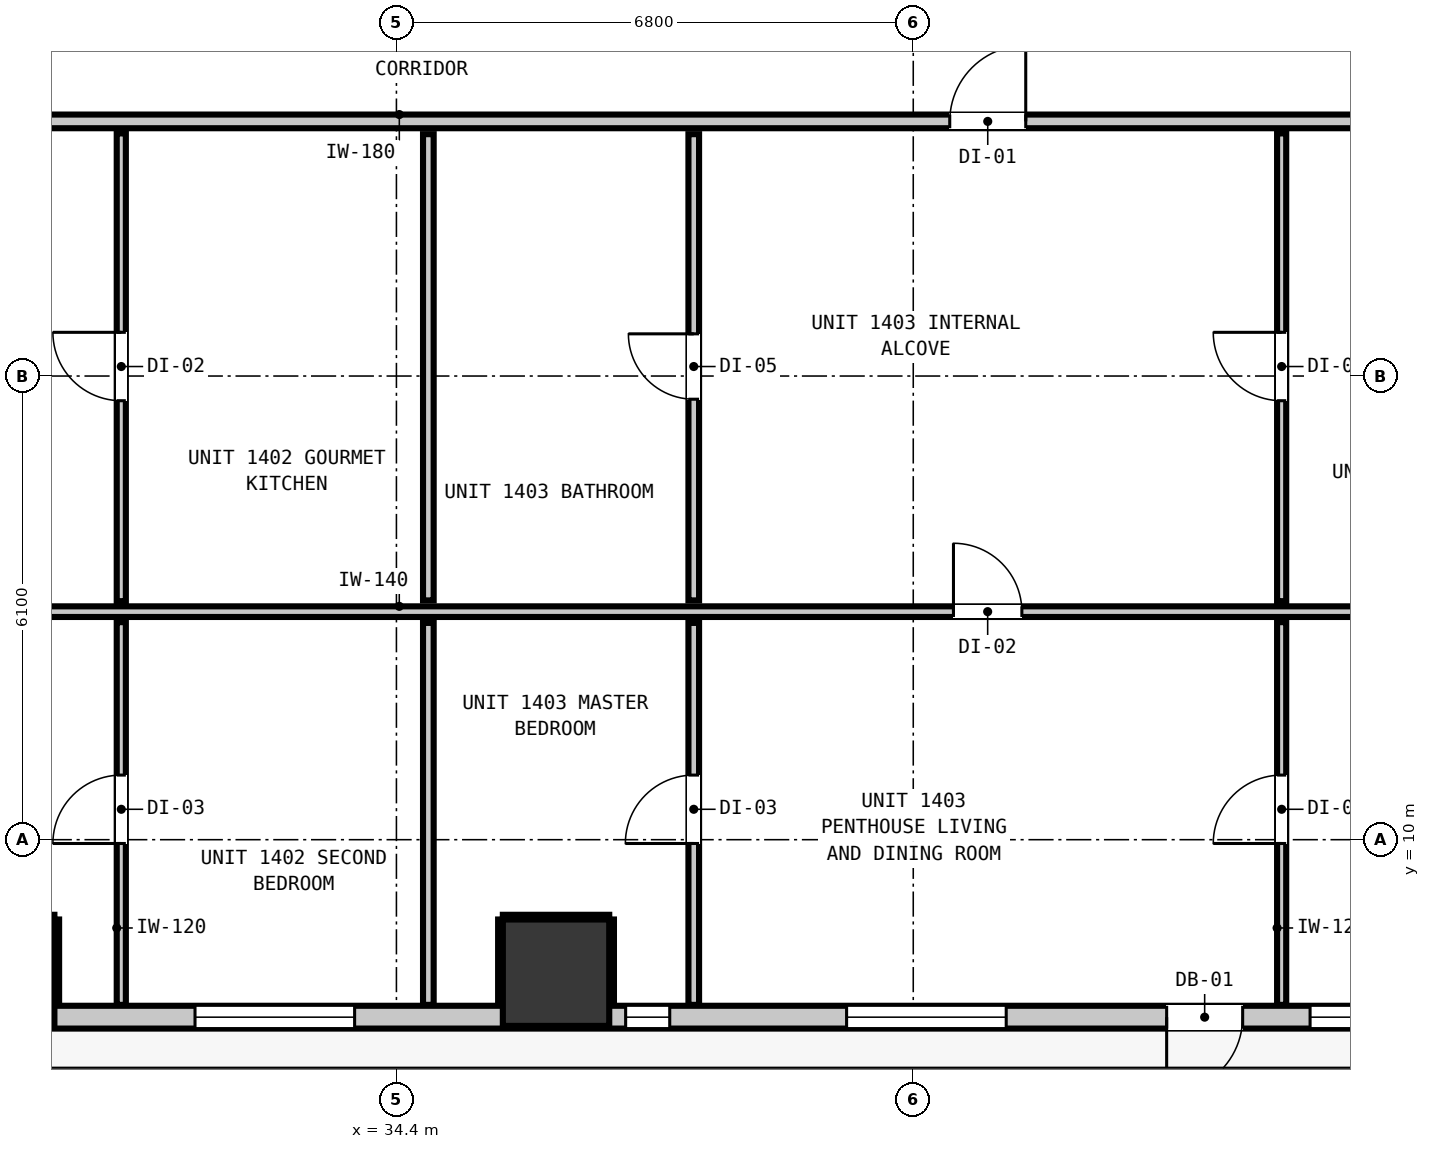
"""IFC4 building model, lengths in metres.
Left out: names, types, materials, properties, quantities, classifications, styles, units other than length and angle.
Written with IfcOpenShell. Run it as: python <this file> out.ifc"""

import sys

from ifc_helpers import new_model, si_unit, direction, frame, frame_2d, origin, origin_2d, place, context, subcontext, project, spatial, rectangle, extrude, element, fill, save


model = new_model("IFC4")
c1 = context("Model", 3, precision=1e-05, world=origin(), true_north=direction((0.0, 1.0)))
c2 = subcontext(c1, "Body", "Model", "MODEL_VIEW")
j1 = project(units=[si_unit("LENGTHUNIT", "METRE"), si_unit("PLANEANGLEUNIT", "RADIAN")], contexts=[c1])
p1 = place(None, origin())
s1 = spatial("IfcSite", under=j1, at=p1, CompositionType="ELEMENT")
p2 = place(p1, origin())
s2 = spatial("IfcBuilding", under=s1, at=p2, CompositionType="ELEMENT")
p3 = place(p2, frame((0.0, 0.0, 51.88)))
s3 = spatial("IfcBuildingStorey", under=s2, at=p3, CompositionType="ELEMENT", Elevation=51.88)
for number, where, z_axis, x_axis in (
    (1, (29.2, 8.25, 0.0), (0.0, 0.0, 1.0), (1.0, 0.0, 0.0)),
    (2, (36.5, 8.25, 0.0), (0.0, 0.0, 1.0), (1.0, 0.0, 0.0)),
):
    element("IfcColumn", number, at=place(p3, frame(where, z_axis=z_axis, x_axis=x_axis)), inside=s3, PredefinedType="COLUMN", context=c2, shape_type="SweptSolid", body=[
        extrude(rectangle(XDim=1.4, YDim=1.4, at=origin_2d()), origin(), (0.0, 0.0, 1.0), 3.32),
    ])
p4 = place(p3, frame((47.835, 7.665, 0.0), z_axis=(0.0, 0.0, 1.0), x_axis=(-1.0, 0.0, 0.0)))
e3 = element("IfcWall", 3, at=p4, inside=s3, PredefinedType="STANDARD", context=c2, shape_type="SweptSolid", body=[
    extrude(rectangle(XDim=37.47, YDim=0.3, at=frame_2d((18.735, 0.0))), origin(), (0.0, 0.0, 1.0), 3.06),
])
p5 = place(p4, frame((2.301, 0.0, 0.0)))
e4 = element("IfcOpeningElement", 4, at=p5, cuts=e3, PredefinedType="OPENING", context=c2, shape_type="SweptSolid", body=[
    extrude(rectangle(XDim=1.0, YDim=2.15, at=frame_2d((0.5, 1.075))), frame((0.0, 0.16, 0.0), z_axis=(0.0, -1.0, 0.0), x_axis=(1.0, 0.0, 0.0)), (0.0, 0.0, 1.0), 0.32),
])
p6 = place(p4, frame((32.251, 0.0, 0.85)))
e5 = element("IfcOpeningElement", 5, at=p6, cuts=e3, PredefinedType="OPENING", context=c2, shape_type="SweptSolid", body=[
    extrude(rectangle(XDim=1.05, YDim=1.65, at=frame_2d((0.525, 0.825))), frame((0.0, 0.16, 0.0), z_axis=(0.0, -1.0, 0.0), x_axis=(1.0, 0.0, 0.0)), (0.0, 0.0, 1.0), 0.32),
])
p7 = place(p4, frame((21.179, 0.0, 0.85)))
e6 = element("IfcOpeningElement", 6, at=p7, cuts=e3, PredefinedType="OPENING", context=c2, shape_type="SweptSolid", body=[
    extrude(rectangle(XDim=2.1, YDim=1.9, at=frame_2d((1.05, 0.95))), frame((0.0, 0.16, 0.0), z_axis=(0.0, -1.0, 0.0), x_axis=(1.0, 0.0, 0.0)), (0.0, 0.0, 1.0), 0.32),
])
p8 = place(p4, frame((25.539, 0.0, 0.85)))
e7 = element("IfcOpeningElement", 7, at=p8, cuts=e3, PredefinedType="OPENING", context=c2, shape_type="SweptSolid", body=[
    extrude(rectangle(XDim=0.58, YDim=1.5, at=frame_2d((0.29, 0.75))), frame((0.0, 0.16, 0.0), z_axis=(0.0, -1.0, 0.0), x_axis=(1.0, 0.0, 0.0)), (0.0, 0.0, 1.0), 0.32),
])
p9 = place(p4, frame((13.985, 0.0, 0.85)))
e8 = element("IfcOpeningElement", 8, at=p9, cuts=e3, PredefinedType="OPENING", context=c2, shape_type="SweptSolid", body=[
    extrude(rectangle(XDim=2.1, YDim=1.9, at=frame_2d((1.05, 0.95))), frame((0.0, 0.16, 0.0), z_axis=(0.0, -1.0, 0.0), x_axis=(1.0, 0.0, 0.0)), (0.0, 0.0, 1.0), 0.32),
])
p10 = place(p4, frame((5.412, 0.0, 0.85)))
e9 = element("IfcOpeningElement", 9, at=p10, cuts=e3, PredefinedType="OPENING", context=c2, shape_type="SweptSolid", body=[
    extrude(rectangle(XDim=2.1, YDim=1.9, at=frame_2d((1.05, 0.95))), frame((0.0, 0.16, 0.0), z_axis=(0.0, -1.0, 0.0), x_axis=(1.0, 0.0, 0.0)), (0.0, 0.0, 1.0), 0.32),
])
p11 = place(p4, frame((9.839, 0.0, 0.85)))
e10 = element("IfcOpeningElement", 10, at=p11, cuts=e3, PredefinedType="OPENING", context=c2, shape_type="SweptSolid", body=[
    extrude(rectangle(XDim=0.58, YDim=1.5, at=frame_2d((0.29, 0.75))), frame((0.0, 0.16, 0.0), z_axis=(0.0, -1.0, 0.0), x_axis=(1.0, 0.0, 0.0)), (0.0, 0.0, 1.0), 0.32),
])
p12 = place(p4, frame((0.364, 0.0, 0.85)))
e11 = element("IfcOpeningElement", 11, at=p12, cuts=e3, PredefinedType="OPENING", context=c2, shape_type="SweptSolid", body=[
    extrude(rectangle(XDim=1.05, YDim=1.65, at=frame_2d((0.525, 0.825))), frame((0.0, 0.16, 0.0), z_axis=(0.0, -1.0, 0.0), x_axis=(1.0, 0.0, 0.0)), (0.0, 0.0, 1.0), 0.32),
])
p13 = place(p3, frame((8.027, 19.45, 0.0), z_axis=(0.0, 0.0, 1.0), x_axis=(1.0, 0.0, 0.0)))
e12 = element("IfcWall", 12, at=p13, inside=s3, PredefinedType="PARTITIONING", context=c2, shape_type="SweptSolid", body=[
    extrude(rectangle(XDim=42.146, YDim=0.18, at=frame_2d((21.073, 0.0))), origin(), (0.0, 0.0, 1.0), 3.06),
])
p14 = place(p13, frame((5.256, 0.0, 0.0)))
e13 = element("IfcOpeningElement", 13, at=p14, cuts=e12, PredefinedType="OPENING", context=c2, shape_type="SweptSolid", body=[
    extrude(rectangle(XDim=1.0, YDim=2.15, at=frame_2d((0.5, 1.075))), frame((0.0, 0.1, 0.0), z_axis=(0.0, -1.0, 0.0), x_axis=(1.0, 0.0, 0.0)), (0.0, 0.0, 1.0), 0.2),
])
p15 = place(p13, frame((18.169, 0.0, 0.0)))
e14 = element("IfcOpeningElement", 14, at=p15, cuts=e12, PredefinedType="OPENING", context=c2, shape_type="SweptSolid", body=[
    extrude(rectangle(XDim=1.0, YDim=2.15, at=frame_2d((0.5, 1.075))), frame((0.0, 0.1, 0.0), z_axis=(0.0, -1.0, 0.0), x_axis=(1.0, 0.0, 0.0)), (0.0, 0.0, 1.0), 0.2),
])
p16 = place(p13, frame((33.653, 0.0, 0.0)))
e15 = element("IfcOpeningElement", 15, at=p16, cuts=e12, PredefinedType="OPENING", context=c2, shape_type="SweptSolid", body=[
    extrude(rectangle(XDim=1.0, YDim=2.15, at=frame_2d((0.5, 1.075))), frame((0.0, 0.1, 0.0), z_axis=(0.0, -1.0, 0.0), x_axis=(1.0, 0.0, 0.0)), (0.0, 0.0, 1.0), 0.2),
])
p17 = place(p3, frame((19.12, 13.0, 0.0), z_axis=(0.0, 0.0, 1.0), x_axis=(1.0, 0.0, 0.0)))
e16 = element("IfcWall", 16, at=p17, inside=s3, PredefinedType="PARTITIONING", context=c2, shape_type="SweptSolid", body=[
    extrude(rectangle(XDim=31.053, YDim=0.14, at=frame_2d((15.526, 0.0))), origin(), (0.0, 0.0, 1.0), 3.06),
])
p18 = place(p17, frame((7.126, 0.0, 0.0)))
e17 = element("IfcOpeningElement", 17, at=p18, cuts=e16, PredefinedType="OPENING", context=c2, shape_type="SweptSolid", body=[
    extrude(rectangle(XDim=0.9, YDim=2.1, at=frame_2d((0.45, 1.05))), frame((0.0, 0.08, 0.0), z_axis=(0.0, -1.0, 0.0), x_axis=(1.0, 0.0, 0.0)), (0.0, 0.0, 1.0), 0.16),
])
p19 = place(p17, frame((22.609, 0.0, 0.0)))
e18 = element("IfcOpeningElement", 18, at=p19, cuts=e16, PredefinedType="OPENING", context=c2, shape_type="SweptSolid", body=[
    extrude(rectangle(XDim=0.9, YDim=2.1, at=frame_2d((0.45, 1.05))), frame((0.0, 0.08, 0.0), z_axis=(0.0, -1.0, 0.0), x_axis=(1.0, 0.0, 0.0)), (0.0, 0.0, 1.0), 0.16),
])
p20 = place(p3, frame((34.82, 7.827, 0.0), z_axis=(0.0, 0.0, 1.0), x_axis=(0.0, 1.0, 0.0)))
e19 = element("IfcWall", 19, at=p20, inside=s3, PredefinedType="PARTITIONING", context=c2, shape_type="SweptSolid", body=[
    extrude(rectangle(XDim=5.025, YDim=0.14, at=frame_2d((2.513, 0.0))), origin(), (0.0, 0.0, 1.0), 3.06),
])
p21 = place(p3, frame((34.82, 13.148, 0.0), z_axis=(0.0, 0.0, 1.0), x_axis=(0.0, 1.0, 0.0)))
e20 = element("IfcWall", 20, at=p21, inside=s3, PredefinedType="PARTITIONING", context=c2, shape_type="SweptSolid", body=[
    extrude(rectangle(XDim=6.134, YDim=0.14, at=frame_2d((3.067, 0.0))), origin(), (0.0, 0.0, 1.0), 3.06),
])
p22 = place(p3, frame((38.312, 7.827, 0.0), z_axis=(0.0, 0.0, 1.0), x_axis=(0.0, 1.0, 0.0)))
e21 = element("IfcWall", 21, at=p22, inside=s3, PredefinedType="PARTITIONING", context=c2, shape_type="SweptSolid", body=[
    extrude(rectangle(XDim=5.025, YDim=0.14, at=frame_2d((2.513, 0.0))), origin(), (0.0, 0.0, 1.0), 3.06),
])
p23 = place(p22, frame((2.123, 0.0, 0.0)))
e22 = element("IfcOpeningElement", 22, at=p23, cuts=e21, PredefinedType="OPENING", context=c2, shape_type="SweptSolid", body=[
    extrude(rectangle(XDim=0.9, YDim=2.1, at=frame_2d((0.45, 1.05))), frame((0.0, 0.08, 0.0), z_axis=(0.0, -1.0, 0.0), x_axis=(1.0, 0.0, 0.0)), (0.0, 0.0, 1.0), 0.16),
])
p24 = place(p3, frame((38.312, 13.148, 0.0), z_axis=(0.0, 0.0, 1.0), x_axis=(0.0, 1.0, 0.0)))
e23 = element("IfcWall", 23, at=p24, inside=s3, PredefinedType="PARTITIONING", context=c2, shape_type="SweptSolid", body=[
    extrude(rectangle(XDim=6.134, YDim=0.14, at=frame_2d((3.067, 0.0))), origin(), (0.0, 0.0, 1.0), 3.06),
])
p25 = place(p24, frame((2.647, 0.0, 0.0)))
e24 = element("IfcOpeningElement", 24, at=p25, cuts=e23, PredefinedType="OPENING", context=c2, shape_type="SweptSolid", body=[
    extrude(rectangle(XDim=0.86, YDim=2.02, at=frame_2d((0.43, 1.01))), frame((0.0, 0.08, 0.0), z_axis=(0.0, -1.0, 0.0), x_axis=(1.0, 0.0, 0.0)), (0.0, 0.0, 1.0), 0.16),
])
p26 = place(p3, frame((30.78, 7.827, 0.0), z_axis=(0.0, 0.0, 1.0), x_axis=(0.0, 1.0, 0.0)))
e25 = element("IfcWall", 25, at=p26, inside=s3, PredefinedType="PARTITIONING", context=c2, shape_type="SweptSolid", body=[
    extrude(rectangle(XDim=5.035, YDim=0.12, at=frame_2d((2.518, 0.0))), origin(), (0.0, 0.0, 1.0), 3.06),
])
p27 = place(p26, frame((2.123, 0.0, 0.0)))
e26 = element("IfcOpeningElement", 26, at=p27, cuts=e25, PredefinedType="OPENING", context=c2, shape_type="SweptSolid", body=[
    extrude(rectangle(XDim=0.9, YDim=2.1, at=frame_2d((0.45, 1.05))), frame((0.0, 0.07, 0.0), z_axis=(0.0, -1.0, 0.0), x_axis=(1.0, 0.0, 0.0)), (0.0, 0.0, 1.0), 0.14),
])
p28 = place(p3, frame((30.78, 13.138, 0.0), z_axis=(0.0, 0.0, 1.0), x_axis=(0.0, 1.0, 0.0)))
e27 = element("IfcWall", 27, at=p28, inside=s3, PredefinedType="PARTITIONING", context=c2, shape_type="SweptSolid", body=[
    extrude(rectangle(XDim=6.154, YDim=0.12, at=frame_2d((3.077, 0.0))), origin(), (0.0, 0.0, 1.0), 3.06),
])
p29 = place(p28, frame((2.637, 0.0, 0.0)))
e28 = element("IfcOpeningElement", 28, at=p29, cuts=e27, PredefinedType="OPENING", context=c2, shape_type="SweptSolid", body=[
    extrude(rectangle(XDim=0.9, YDim=2.1, at=frame_2d((0.45, 1.05))), frame((0.0, 0.07, 0.0), z_axis=(0.0, -1.0, 0.0), x_axis=(1.0, 0.0, 0.0)), (0.0, 0.0, 1.0), 0.14),
])
p30 = place(p3, frame((46.047, 7.827, 0.0), z_axis=(0.0, 0.0, 1.0), x_axis=(0.0, 1.0, 0.0)))
e29 = element("IfcWall", 29, at=p30, inside=s3, PredefinedType="PARTITIONING", context=c2, shape_type="SweptSolid", body=[
    extrude(rectangle(XDim=5.035, YDim=0.12, at=frame_2d((2.518, 0.0))), origin(), (0.0, 0.0, 1.0), 3.06),
])
p31 = place(p30, frame((2.123, 0.0, 0.0)))
e30 = element("IfcOpeningElement", 30, at=p31, cuts=e29, PredefinedType="OPENING", context=c2, shape_type="SweptSolid", body=[
    extrude(rectangle(XDim=0.9, YDim=2.1, at=frame_2d((0.45, 1.05))), frame((0.0, 0.07, 0.0), z_axis=(0.0, -1.0, 0.0), x_axis=(1.0, 0.0, 0.0)), (0.0, 0.0, 1.0), 0.14),
])
p32 = place(p3, frame((46.047, 13.138, 0.0), z_axis=(0.0, 0.0, 1.0), x_axis=(0.0, 1.0, 0.0)))
e31 = element("IfcWall", 31, at=p32, inside=s3, PredefinedType="PARTITIONING", context=c2, shape_type="SweptSolid", body=[
    extrude(rectangle(XDim=6.154, YDim=0.12, at=frame_2d((3.077, 0.0))), origin(), (0.0, 0.0, 1.0), 3.06),
])
p33 = place(p32, frame((2.637, 0.0, 0.0)))
e32 = element("IfcOpeningElement", 32, at=p33, cuts=e31, PredefinedType="OPENING", context=c2, shape_type="SweptSolid", body=[
    extrude(rectangle(XDim=0.9, YDim=2.1, at=frame_2d((0.45, 1.05))), frame((0.0, 0.07, 0.0), z_axis=(0.0, -1.0, 0.0), x_axis=(1.0, 0.0, 0.0)), (0.0, 0.0, 1.0), 0.14),
])
p34 = place(p3, frame((28.5, 8.982, 0.0), z_axis=(0.0, 0.0, 1.0), x_axis=(1.0, 0.0, 0.0)))
e33 = element("IfcWall", 33, at=p34, inside=s3, PredefinedType="PARTITIONING", context=c2, shape_type="SweptSolid", body=[
    extrude(rectangle(XDim=1.4, YDim=0.06, at=frame_2d((0.7, 0.0))), origin(), (0.0, 0.0, 1.0), 1.45),
])
p35 = place(p3, frame((29.932, 7.83, 0.0), z_axis=(0.0, 0.0, 1.0), x_axis=(0.0, 1.0, 0.0)))
e34 = element("IfcWall", 34, at=p35, inside=s3, PredefinedType="PARTITIONING", context=c2, shape_type="SweptSolid", body=[
    extrude(rectangle(XDim=1.12, YDim=0.06, at=frame_2d((0.56, 0.0))), origin(), (0.0, 0.0, 1.0), 1.45),
])
p36 = place(p3, frame((35.8, 8.982, 0.0), z_axis=(0.0, 0.0, 1.0), x_axis=(1.0, 0.0, 0.0)))
e35 = element("IfcWall", 35, at=p36, inside=s3, PredefinedType="PARTITIONING", context=c2, shape_type="SweptSolid", body=[
    extrude(rectangle(XDim=1.4, YDim=0.06, at=frame_2d((0.7, 0.0))), origin(), (0.0, 0.0, 1.0), 1.45),
])
for number, where, z_axis, x_axis in (
    (36, (35.768, 7.83, 0.0), (0.0, 0.0, 1.0), (0.0, 1.0, 0.0)),
    (37, (37.232, 7.83, 0.0), (0.0, 0.0, 1.0), (0.0, 1.0, 0.0)),
):
    element("IfcWall", number, at=place(p3, frame(where, z_axis=z_axis, x_axis=x_axis)), inside=s3, PredefinedType="PARTITIONING", context=c2, shape_type="SweptSolid", body=[
        extrude(rectangle(XDim=1.12, YDim=0.06, at=frame_2d((0.56, 0.0))), origin(), (0.0, 0.0, 1.0), 1.45),
    ])
p37 = place(p5, origin())
e38 = element("IfcDoor", 38, at=p37, inside=s3, OperationType="SINGLE_SWING_RIGHT", PredefinedType="DOOR", context=c2, shape_type="SweptSolid", body=[
    extrude(rectangle(XDim=1.0, YDim=2.15, at=frame_2d((0.5, 1.075))), frame((0.0, 0.025, 0.0), z_axis=(0.0, -1.0, 0.0), x_axis=(1.0, 0.0, 0.0)), (0.0, 0.0, 1.0), 0.05),
])
fill(e4, e38)
p38 = place(p9, origin())
e39 = element("IfcWindow", 39, at=p38, inside=s3, PartitioningType="SINGLE_PANEL", PredefinedType="WINDOW", context=c2, shape_type="SweptSolid", body=[
    extrude(rectangle(XDim=2.1, YDim=1.9, at=frame_2d((1.05, 0.95))), frame((0.0, 0.03, 0.0), z_axis=(0.0, -1.0, 0.0), x_axis=(1.0, 0.0, 0.0)), (0.0, 0.0, 1.0), 0.06),
])
fill(e8, e39)
p39 = place(p10, origin())
e40 = element("IfcWindow", 40, at=p39, inside=s3, PartitioningType="SINGLE_PANEL", PredefinedType="WINDOW", context=c2, shape_type="SweptSolid", body=[
    extrude(rectangle(XDim=2.1, YDim=1.9, at=frame_2d((1.05, 0.95))), frame((0.0, 0.03, 0.0), z_axis=(0.0, -1.0, 0.0), x_axis=(1.0, 0.0, 0.0)), (0.0, 0.0, 1.0), 0.06),
])
fill(e9, e40)
p40 = place(p11, origin())
e41 = element("IfcWindow", 41, at=p40, inside=s3, PartitioningType="SINGLE_PANEL", PredefinedType="WINDOW", context=c2, shape_type="SweptSolid", body=[
    extrude(rectangle(XDim=0.58, YDim=1.5, at=frame_2d((0.29, 0.75))), frame((0.0, 0.03, 0.0), z_axis=(0.0, -1.0, 0.0), x_axis=(1.0, 0.0, 0.0)), (0.0, 0.0, 1.0), 0.06),
])
fill(e10, e41)
p41 = place(p12, origin())
e42 = element("IfcWindow", 42, at=p41, inside=s3, PartitioningType="SINGLE_PANEL", PredefinedType="WINDOW", context=c2, shape_type="SweptSolid", body=[
    extrude(rectangle(XDim=1.05, YDim=1.65, at=frame_2d((0.525, 0.825))), frame((0.0, 0.03, 0.0), z_axis=(0.0, -1.0, 0.0), x_axis=(1.0, 0.0, 0.0)), (0.0, 0.0, 1.0), 0.06),
])
fill(e11, e42)
p42 = place(p29, origin())
e43 = element("IfcDoor", 43, at=p42, inside=s3, OperationType="SINGLE_SWING_RIGHT", PredefinedType="DOOR", context=c2, shape_type="SweptSolid", body=[
    extrude(rectangle(XDim=0.9, YDim=2.1, at=frame_2d((0.45, 1.05))), frame((0.0, 0.025, 0.0), z_axis=(0.0, -1.0, 0.0), x_axis=(1.0, 0.0, 0.0)), (0.0, 0.0, 1.0), 0.05),
])
fill(e28, e43)
p43 = place(p27, origin())
e44 = element("IfcDoor", 44, at=p43, inside=s3, OperationType="SINGLE_SWING_LEFT", PredefinedType="DOOR", context=c2, shape_type="SweptSolid", body=[
    extrude(rectangle(XDim=0.9, YDim=2.1, at=frame_2d((0.45, 1.05))), frame((0.0, 0.025, 0.0), z_axis=(0.0, -1.0, 0.0), x_axis=(1.0, 0.0, 0.0)), (0.0, 0.0, 1.0), 0.05),
])
fill(e26, e44)
p44 = place(p16, origin())
e45 = element("IfcDoor", 45, at=p44, inside=s3, OperationType="SINGLE_SWING_RIGHT", PredefinedType="DOOR", context=c2, shape_type="SweptSolid", body=[
    extrude(rectangle(XDim=1.0, YDim=2.15, at=frame_2d((0.5, 1.075))), frame((0.0, 0.025, 0.0), z_axis=(0.0, -1.0, 0.0), x_axis=(1.0, 0.0, 0.0)), (0.0, 0.0, 1.0), 0.05),
])
fill(e15, e45)
p45 = place(p19, origin())
e46 = element("IfcDoor", 46, at=p45, inside=s3, OperationType="SINGLE_SWING_LEFT", PredefinedType="DOOR", context=c2, shape_type="SweptSolid", body=[
    extrude(rectangle(XDim=0.9, YDim=2.1, at=frame_2d((0.45, 1.05))), frame((0.0, 0.025, 0.0), z_axis=(0.0, -1.0, 0.0), x_axis=(1.0, 0.0, 0.0)), (0.0, 0.0, 1.0), 0.05),
])
fill(e18, e46)
p46 = place(p25, origin())
e47 = element("IfcDoor", 47, at=p46, inside=s3, OperationType="SINGLE_SWING_RIGHT", PredefinedType="DOOR", context=c2, shape_type="SweptSolid", body=[
    extrude(rectangle(XDim=0.86, YDim=2.02, at=frame_2d((0.43, 1.01))), frame((0.0, 0.025, 0.0), z_axis=(0.0, -1.0, 0.0), x_axis=(1.0, 0.0, 0.0)), (0.0, 0.0, 1.0), 0.05),
])
fill(e24, e47)
p47 = place(p23, origin())
e48 = element("IfcDoor", 48, at=p47, inside=s3, OperationType="SINGLE_SWING_LEFT", PredefinedType="DOOR", context=c2, shape_type="SweptSolid", body=[
    extrude(rectangle(XDim=0.9, YDim=2.1, at=frame_2d((0.45, 1.05))), frame((0.0, 0.025, 0.0), z_axis=(0.0, -1.0, 0.0), x_axis=(1.0, 0.0, 0.0)), (0.0, 0.0, 1.0), 0.05),
])
fill(e22, e48)
p48 = place(p33, origin())
e49 = element("IfcDoor", 49, at=p48, inside=s3, OperationType="SINGLE_SWING_RIGHT", PredefinedType="DOOR", context=c2, shape_type="SweptSolid", body=[
    extrude(rectangle(XDim=0.9, YDim=2.1, at=frame_2d((0.45, 1.05))), frame((0.0, 0.025, 0.0), z_axis=(0.0, -1.0, 0.0), x_axis=(1.0, 0.0, 0.0)), (0.0, 0.0, 1.0), 0.05),
])
fill(e32, e49)
p49 = place(p31, origin())
e50 = element("IfcDoor", 50, at=p49, inside=s3, OperationType="SINGLE_SWING_LEFT", PredefinedType="DOOR", context=c2, shape_type="SweptSolid", body=[
    extrude(rectangle(XDim=0.9, YDim=2.1, at=frame_2d((0.45, 1.05))), frame((0.0, 0.025, 0.0), z_axis=(0.0, -1.0, 0.0), x_axis=(1.0, 0.0, 0.0)), (0.0, 0.0, 1.0), 0.05),
])
fill(e30, e50)
save(model, sys.argv[1])
